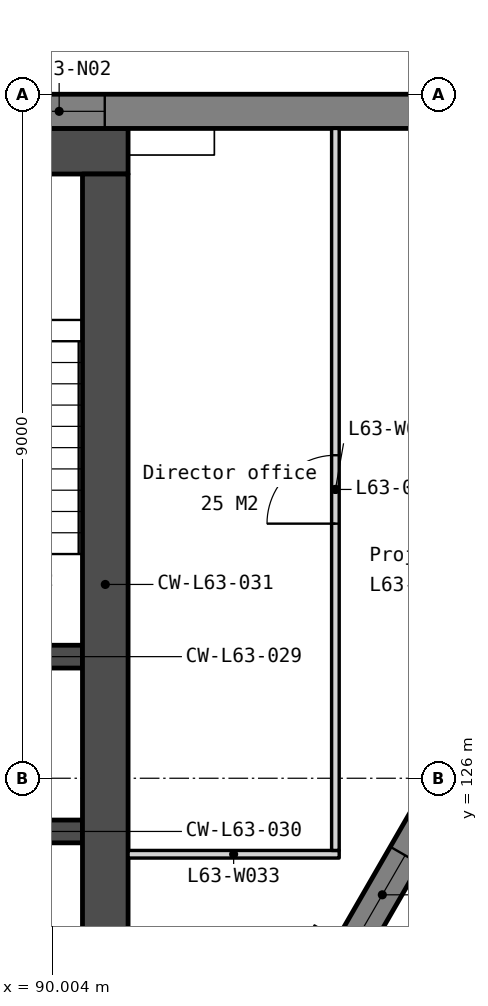
"""IFC4 building model, lengths in metres.
Left out: names, types, materials, properties, quantities, classifications, styles, units other than length and angle.
Written with IfcOpenShell. Run it as: python <this file> out.ifc"""

import sys

from ifc_helpers import new_model, si_unit, direction, frame, frame_2d, origin, place, context, subcontext, project, spatial, polyline, rectangle, outline, extrude, element, fill, save


model = new_model("IFC4")
c1 = context("Model", 3, precision=1e-05, world=origin(), true_north=direction((0.0, 1.0)))
c2 = subcontext(c1, "Body", "Model", "MODEL_VIEW")
j1 = project(units=[si_unit("LENGTHUNIT", "METRE"), si_unit("PLANEANGLEUNIT", "RADIAN")], contexts=[c1])
p1 = place(None, origin())
s1 = spatial("IfcSite", under=j1, at=p1, CompositionType="ELEMENT")
p2 = place(p1, origin())
s2 = spatial("IfcBuilding", under=s1, at=p2, CompositionType="ELEMENT")
p3 = place(p2, frame((0.0, 0.0, 258.2)))
s3 = spatial("IfcBuildingStorey", under=s2, at=p3, CompositionType="ELEMENT", Elevation=258.2)
p4 = place(p3, frame((69.0, 134.25, 0.0), z_axis=(0.0, 0.0, 1.0), x_axis=(1.0, 0.0, 0.0)))
e1 = element("IfcWall", 1, at=p4, inside=s3, PredefinedType="SOLIDWALL", context=c2, shape_type="SweptSolid", body=[
    extrude(rectangle(XDim=22.0, YDim=0.6, at=frame_2d((11.0, 0.0))), origin(), (0.0, 0.0, 1.0), 3.75),
])
for number, where, z_axis, x_axis in (
    (2, (87.85, 127.6, 0.0), (0.0, 0.0, 1.0), (1.0, 0.0, 0.0)),
    (3, (87.85, 125.3, 0.0), (0.0, 0.0, 1.0), (1.0, 0.0, 0.0)),
):
    element("IfcWall", number, at=place(p3, frame(where, z_axis=z_axis, x_axis=x_axis)), inside=s3, PredefinedType="SOLIDWALL", context=c2, shape_type="SweptSolid", body=[
        extrude(rectangle(XDim=2.55, YDim=0.3, at=frame_2d((1.275, 0.0))), origin(), (0.0, 0.0, 1.0), 3.75),
    ])
p5 = place(p3, frame((90.7, 133.95, 0.0), z_axis=(0.0, 0.0, 1.0), x_axis=(0.0, -1.0, 0.0)))
e4 = element("IfcWall", 4, at=p5, inside=s3, PredefinedType="SOLIDWALL", context=c2, shape_type="SweptSolid", body=[
    extrude(rectangle(XDim=10.8, YDim=0.6, at=frame_2d((5.4, 0.0))), origin(), (0.0, 0.0, 1.0), 3.75),
])
p6 = place(p3, frame((98.486, 134.775, -0.15), z_axis=(0.0, 0.0, 1.0), x_axis=(-1.0, 0.0, 0.0)))
e5 = element("IfcWall", 5, at=p6, inside=s3, PredefinedType="SOLIDWALL", context=c2, shape_type="SweptSolid", body=[
    extrude(outline(polyline([(36.972, 0.0), (36.972, 3.9), (0.0, 3.9), (0.0, 0.0), (36.972, 0.0)])), frame((0.0, 0.225, 0.0), z_axis=(0.0, -1.0, 0.0), x_axis=(1.0, 0.0, 0.0)), (0.0, 0.0, 1.0), 0.45),
])
p7 = place(p6, frame((0.715, 0.0, 0.95)))
e6 = element("IfcOpeningElement", 6, at=p7, cuts=e5, PredefinedType="OPENING", context=c2, shape_type="SweptSolid", body=[
    extrude(rectangle(XDim=1.2, YDim=2.2, at=frame_2d((0.6, 1.1))), frame((0.0, 0.235, 0.0), z_axis=(0.0, -1.0, 0.0), x_axis=(1.0, 0.0, 0.0)), (0.0, 0.0, 1.0), 0.47),
])
p8 = place(p6, frame((7.793, 0.0, 0.95)))
e7 = element("IfcOpeningElement", 7, at=p8, cuts=e5, PredefinedType="OPENING", context=c2, shape_type="SweptSolid", body=[
    extrude(rectangle(XDim=1.2, YDim=2.2, at=frame_2d((0.6, 1.1))), frame((0.0, 0.235, 0.0), z_axis=(0.0, -1.0, 0.0), x_axis=(1.0, 0.0, 0.0)), (0.0, 0.0, 1.0), 0.47),
])
p9 = place(p6, frame((9.493, 0.0, 0.95)))
e8 = element("IfcOpeningElement", 8, at=p9, cuts=e5, PredefinedType="OPENING", context=c2, shape_type="SweptSolid", body=[
    extrude(rectangle(XDim=1.2, YDim=2.2, at=frame_2d((0.6, 1.1))), frame((0.0, 0.235, 0.0), z_axis=(0.0, -1.0, 0.0), x_axis=(1.0, 0.0, 0.0)), (0.0, 0.0, 1.0), 0.47),
])
p10 = place(p6, frame((17.036, 0.0, 0.95)))
e9 = element("IfcOpeningElement", 9, at=p10, cuts=e5, PredefinedType="OPENING", context=c2, shape_type="SweptSolid", body=[
    extrude(rectangle(XDim=1.2, YDim=2.2, at=frame_2d((0.6, 1.1))), frame((0.0, 0.235, 0.0), z_axis=(0.0, -1.0, 0.0), x_axis=(1.0, 0.0, 0.0)), (0.0, 0.0, 1.0), 0.47),
])
p11 = place(p6, frame((18.736, 0.0, 0.95)))
e10 = element("IfcOpeningElement", 10, at=p11, cuts=e5, PredefinedType="OPENING", context=c2, shape_type="SweptSolid", body=[
    extrude(rectangle(XDim=1.2, YDim=2.2, at=frame_2d((0.6, 1.1))), frame((0.0, 0.235, 0.0), z_axis=(0.0, -1.0, 0.0), x_axis=(1.0, 0.0, 0.0)), (0.0, 0.0, 1.0), 0.47),
])
p12 = place(p6, frame((26.279, 0.0, 0.95)))
e11 = element("IfcOpeningElement", 11, at=p12, cuts=e5, PredefinedType="OPENING", context=c2, shape_type="SweptSolid", body=[
    extrude(rectangle(XDim=1.2, YDim=2.2, at=frame_2d((0.6, 1.1))), frame((0.0, 0.235, 0.0), z_axis=(0.0, -1.0, 0.0), x_axis=(1.0, 0.0, 0.0)), (0.0, 0.0, 1.0), 0.47),
])
p13 = place(p6, frame((27.979, 0.0, 0.95)))
e12 = element("IfcOpeningElement", 12, at=p13, cuts=e5, PredefinedType="OPENING", context=c2, shape_type="SweptSolid", body=[
    extrude(rectangle(XDim=1.2, YDim=2.2, at=frame_2d((0.6, 1.1))), frame((0.0, 0.235, 0.0), z_axis=(0.0, -1.0, 0.0), x_axis=(1.0, 0.0, 0.0)), (0.0, 0.0, 1.0), 0.47),
])
p14 = place(p6, frame((35.058, 0.0, 0.95)))
e13 = element("IfcOpeningElement", 13, at=p14, cuts=e5, PredefinedType="OPENING", context=c2, shape_type="SweptSolid", body=[
    extrude(rectangle(XDim=1.2, YDim=2.2, at=frame_2d((0.6, 1.1))), frame((0.0, 0.235, 0.0), z_axis=(0.0, -1.0, 0.0), x_axis=(1.0, 0.0, 0.0)), (0.0, 0.0, 1.0), 0.47),
])
p15 = place(p3, frame((80.905, 101.188, -0.15), z_axis=(0.0, 0.0, 1.0), x_axis=(0.500002536638, 0.866023939251, 0.0)))
e14 = element("IfcWall", 14, at=p15, inside=s3, PredefinedType="SOLIDWALL", context=c2, shape_type="SweptSolid", body=[
    extrude(outline(polyline([(36.972, 0.0), (36.972, 3.9), (0.0, 3.9), (0.0, 0.0), (36.972, 0.0)])), frame((0.0, 0.225, 0.0), z_axis=(0.0, -1.0, 0.0), x_axis=(1.0, 0.0, 0.0)), (0.0, 0.0, 1.0), 0.45),
])
p16 = place(p15, frame((0.715, 0.0, 0.95)))
e15 = element("IfcOpeningElement", 15, at=p16, cuts=e14, PredefinedType="OPENING", context=c2, shape_type="SweptSolid", body=[
    extrude(rectangle(XDim=1.2, YDim=2.2, at=frame_2d((0.6, 1.1))), frame((0.0, 0.235, 0.0), z_axis=(0.0, -1.0, 0.0), x_axis=(1.0, 0.0, 0.0)), (0.0, 0.0, 1.0), 0.47),
])
p17 = place(p15, frame((7.793, 0.0, 0.95)))
e16 = element("IfcOpeningElement", 16, at=p17, cuts=e14, PredefinedType="OPENING", context=c2, shape_type="SweptSolid", body=[
    extrude(rectangle(XDim=1.2, YDim=2.2, at=frame_2d((0.6, 1.1))), frame((0.0, 0.235, 0.0), z_axis=(0.0, -1.0, 0.0), x_axis=(1.0, 0.0, 0.0)), (0.0, 0.0, 1.0), 0.47),
])
p18 = place(p15, frame((9.493, 0.0, 0.95)))
e17 = element("IfcOpeningElement", 17, at=p18, cuts=e14, PredefinedType="OPENING", context=c2, shape_type="SweptSolid", body=[
    extrude(rectangle(XDim=1.2, YDim=2.2, at=frame_2d((0.6, 1.1))), frame((0.0, 0.235, 0.0), z_axis=(0.0, -1.0, 0.0), x_axis=(1.0, 0.0, 0.0)), (0.0, 0.0, 1.0), 0.47),
])
p19 = place(p15, frame((17.036, 0.0, 0.95)))
e18 = element("IfcOpeningElement", 18, at=p19, cuts=e14, PredefinedType="OPENING", context=c2, shape_type="SweptSolid", body=[
    extrude(rectangle(XDim=1.2, YDim=2.2, at=frame_2d((0.6, 1.1))), frame((0.0, 0.235, 0.0), z_axis=(0.0, -1.0, 0.0), x_axis=(1.0, 0.0, 0.0)), (0.0, 0.0, 1.0), 0.47),
])
p20 = place(p15, frame((18.736, 0.0, 0.95)))
e19 = element("IfcOpeningElement", 19, at=p20, cuts=e14, PredefinedType="OPENING", context=c2, shape_type="SweptSolid", body=[
    extrude(rectangle(XDim=1.2, YDim=2.2, at=frame_2d((0.6, 1.1))), frame((0.0, 0.235, 0.0), z_axis=(0.0, -1.0, 0.0), x_axis=(1.0, 0.0, 0.0)), (0.0, 0.0, 1.0), 0.47),
])
p21 = place(p15, frame((26.279, 0.0, 0.95)))
e20 = element("IfcOpeningElement", 20, at=p21, cuts=e14, PredefinedType="OPENING", context=c2, shape_type="SweptSolid", body=[
    extrude(rectangle(XDim=1.2, YDim=2.2, at=frame_2d((0.6, 1.1))), frame((0.0, 0.235, 0.0), z_axis=(0.0, -1.0, 0.0), x_axis=(1.0, 0.0, 0.0)), (0.0, 0.0, 1.0), 0.47),
])
p22 = place(p15, frame((27.979, 0.0, 0.95)))
e21 = element("IfcOpeningElement", 21, at=p22, cuts=e14, PredefinedType="OPENING", context=c2, shape_type="SweptSolid", body=[
    extrude(rectangle(XDim=1.2, YDim=2.2, at=frame_2d((0.6, 1.1))), frame((0.0, 0.235, 0.0), z_axis=(0.0, -1.0, 0.0), x_axis=(1.0, 0.0, 0.0)), (0.0, 0.0, 1.0), 0.47),
])
p23 = place(p15, frame((35.058, 0.0, 0.95)))
e22 = element("IfcOpeningElement", 22, at=p23, cuts=e14, PredefinedType="OPENING", context=c2, shape_type="SweptSolid", body=[
    extrude(rectangle(XDim=1.2, YDim=2.2, at=frame_2d((0.6, 1.1))), frame((0.0, 0.235, 0.0), z_axis=(0.0, -1.0, 0.0), x_axis=(1.0, 0.0, 0.0)), (0.0, 0.0, 1.0), 0.47),
])
p24 = place(p3, frame((91.0, 125.0, 0.0), z_axis=(0.0, 0.0, 1.0), x_axis=(1.0, 0.0, 0.0)))
e23 = element("IfcWall", 23, at=p24, inside=s3, PredefinedType="PARTITIONING", context=c2, shape_type="SweptSolid", body=[
    extrude(rectangle(XDim=2.778, YDim=0.1, at=frame_2d((1.389, 0.0))), origin(), (0.0, 0.0, 1.0), 3.75),
])
p25 = place(p3, frame((93.728, 125.05, 0.0), z_axis=(0.0, 0.0, 1.0), x_axis=(0.0, 1.0, 0.0)))
e24 = element("IfcWall", 24, at=p25, inside=s3, PredefinedType="PARTITIONING", context=c2, shape_type="SweptSolid", body=[
    extrude(rectangle(XDim=9.5, YDim=0.1, at=frame_2d((4.75, 0.0))), origin(), (0.0, 0.0, 1.0), 3.75),
])
p26 = place(p25, frame((4.3, 0.0, 0.0)))
e25 = element("IfcOpeningElement", 25, at=p26, cuts=e24, PredefinedType="OPENING", context=c2, shape_type="SweptSolid", body=[
    extrude(rectangle(XDim=0.9, YDim=2.1, at=frame_2d((0.45, 1.05))), frame((0.0, 0.06, 0.0), z_axis=(0.0, -1.0, 0.0), x_axis=(1.0, 0.0, 0.0)), (0.0, 0.0, 1.0), 0.12),
])
p27 = place(p8, origin())
e26 = element("IfcWindow", 26, at=p27, inside=s3, PartitioningType="SINGLE_PANEL", PredefinedType="WINDOW", context=c2, shape_type="SweptSolid", body=[
    extrude(rectangle(XDim=1.2, YDim=2.2, at=frame_2d((0.6, 1.1))), frame((0.0, 0.03, 0.0), z_axis=(0.0, -1.0, 0.0), x_axis=(1.0, 0.0, 0.0)), (0.0, 0.0, 1.0), 0.06),
])
fill(e7, e26)
p28 = place(p21, origin())
e27 = element("IfcWindow", 27, at=p28, inside=s3, PartitioningType="SINGLE_PANEL", PredefinedType="WINDOW", context=c2, shape_type="SweptSolid", body=[
    extrude(rectangle(XDim=1.2, YDim=2.2, at=frame_2d((0.6, 1.1))), frame((0.0, 0.03, 0.0), z_axis=(0.0, -1.0, 0.0), x_axis=(1.0, 0.0, 0.0)), (0.0, 0.0, 1.0), 0.06),
])
fill(e20, e27)
p29 = place(p26, origin())
e28 = element("IfcDoor", 28, at=p29, inside=s3, OperationType="SINGLE_SWING_LEFT", PredefinedType="DOOR", context=c2, shape_type="SweptSolid", body=[
    extrude(rectangle(XDim=0.9, YDim=2.1, at=frame_2d((0.45, 1.05))), frame((0.0, 0.025, 0.0), z_axis=(0.0, -1.0, 0.0), x_axis=(1.0, 0.0, 0.0)), (0.0, 0.0, 1.0), 0.05),
])
fill(e25, e28)
save(model, sys.argv[1])
